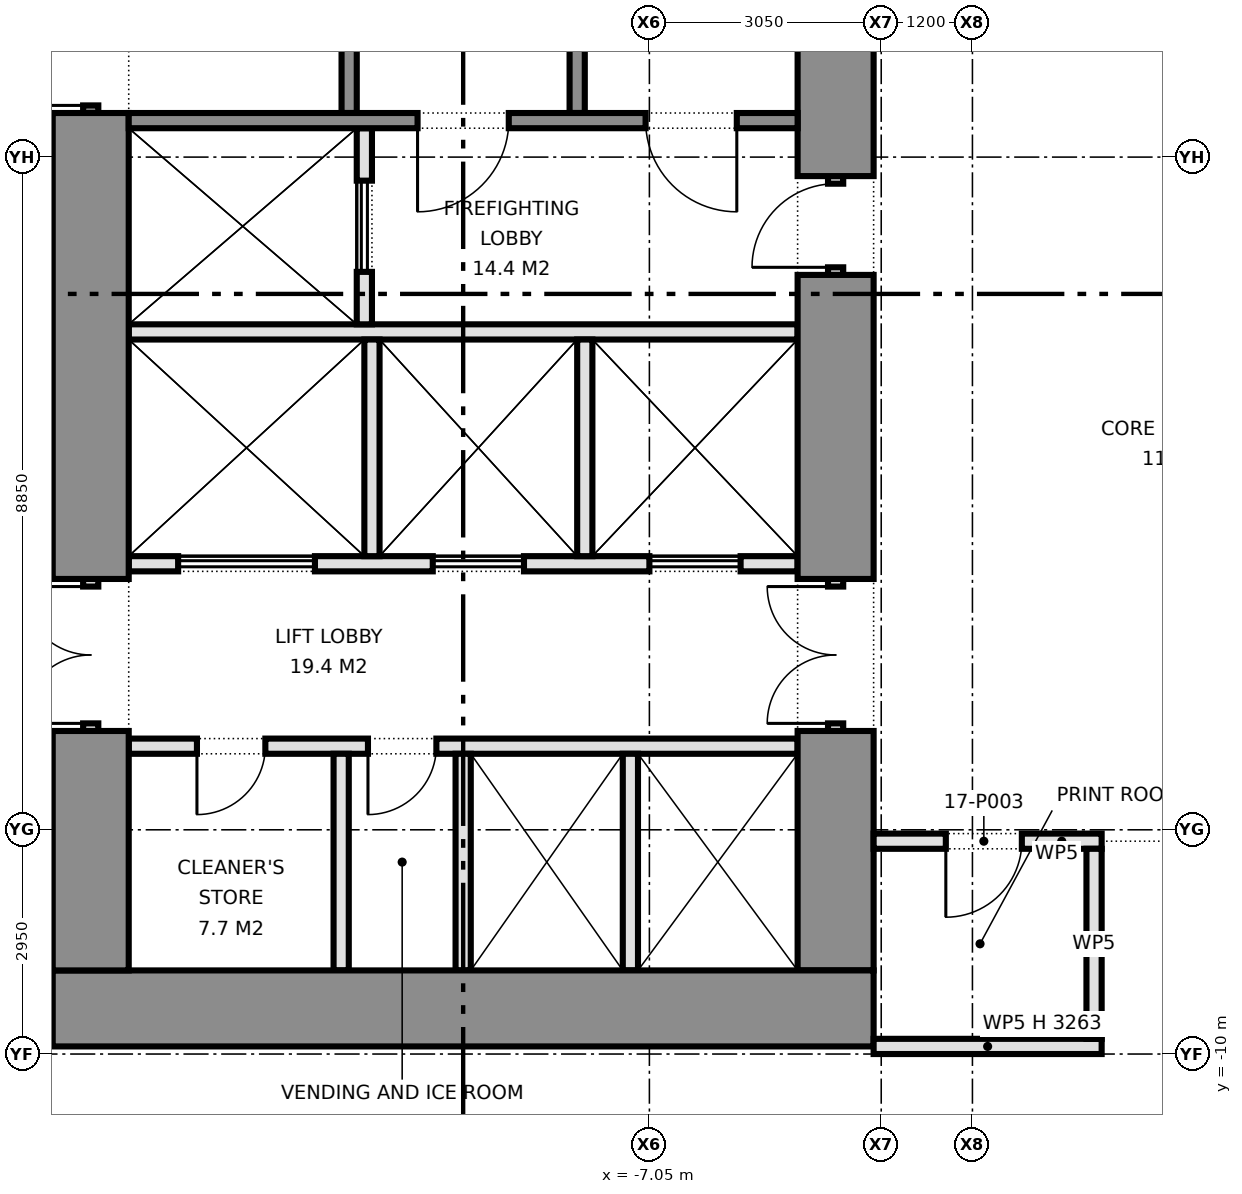
"""IFC4 building model, lengths in metres.
Left out: names, types, materials, properties, quantities, classifications, styles, units other than length and angle.
Written with IfcOpenShell. Run it as: python <this file> out.ifc"""

import sys

from ifc_helpers import new_model, si_unit, direction, frame, frame_2d, origin, place, context, subcontext, project, spatial, rectangle, extrude, element, fill, save


model = new_model("IFC4")
c1 = context("Model", 3, precision=1e-05, world=origin(), true_north=direction((0.0, 1.0)))
c2 = subcontext(c1, "Body", "Model", "MODEL_VIEW")
j1 = project(units=[si_unit("LENGTHUNIT", "METRE"), si_unit("PLANEANGLEUNIT", "RADIAN")], contexts=[c1])
p1 = place(None, origin())
s1 = spatial("IfcSite", under=j1, at=p1, CompositionType="ELEMENT")
p2 = place(p1, origin())
s2 = spatial("IfcBuilding", under=s1, at=p2, CompositionType="ELEMENT")
p3 = place(p2, frame((0.0, 0.0, 77.6)))
s3 = spatial("IfcBuildingStorey", under=s2, at=p3, CompositionType="ELEMENT", Elevation=77.6)
p4 = place(p3, frame((-14.9, -9.4, 0.0), z_axis=(0.0, 0.0, 1.0), x_axis=(1.0, 0.0, 0.0)))
e1 = element("IfcWall", 1, at=p4, inside=s3, PredefinedType="SHEAR", context=c2, shape_type="SweptSolid", body=[
    extrude(rectangle(XDim=10.8, YDim=1.0, at=frame_2d((5.4, 0.0))), origin(), (0.0, 0.0, 1.0), 4.2),
])
p5 = place(p3, frame((-14.4, -8.9, 0.0), z_axis=(0.0, 0.0, 1.0), x_axis=(0.0, 1.0, 0.0)))
e2 = element("IfcWall", 2, at=p5, inside=s3, PredefinedType="SHEAR", context=c2, shape_type="SweptSolid", body=[
    extrude(rectangle(XDim=3.15, YDim=1.0, at=frame_2d((1.575, 0.0))), origin(), (0.0, 0.0, 1.0), 4.2),
])
p6 = place(p3, frame((-14.4, -5.75, 0.0), z_axis=(0.0, 0.0, 1.0), x_axis=(0.0, 1.0, 0.0)))
e3 = element("IfcWall", 3, at=p6, inside=s3, PredefinedType="PARTITIONING", context=c2, shape_type="SweptSolid", body=[
    extrude(rectangle(XDim=2.0, YDim=0.2, at=frame_2d((1.0, 0.0))), origin(), (0.0, 0.0, 1.0), 2.4),
])
p7 = place(p6, frame((0.1, 0.0, 0.0)))
e4 = element("IfcOpeningElement", 4, at=p7, cuts=e3, PredefinedType="OPENING", context=c2, shape_type="SweptSolid", body=[
    extrude(rectangle(XDim=1.8, YDim=2.1, at=frame_2d((0.9, 1.05))), frame((0.0, 0.11, 0.0), z_axis=(0.0, -1.0, 0.0), x_axis=(1.0, 0.0, 0.0)), (0.0, 0.0, 1.0), 0.22),
])
p8 = place(p3, frame((-14.4, -3.75, 0.0), z_axis=(0.0, 0.0, 1.0), x_axis=(0.0, 1.0, 0.0)))
e5 = element("IfcWall", 5, at=p8, inside=s3, PredefinedType="SHEAR", context=c2, shape_type="SweptSolid", body=[
    extrude(rectangle(XDim=6.13, YDim=1.0, at=frame_2d((3.065, 0.0))), origin(), (0.0, 0.0, 1.0), 4.2),
])
p9 = place(p3, frame((-14.4, 2.38, 0.0), z_axis=(0.0, 0.0, 1.0), x_axis=(0.0, 1.0, 0.0)))
e6 = element("IfcWall", 6, at=p9, inside=s3, PredefinedType="SHEAR", context=c2, shape_type="SweptSolid", body=[
    extrude(rectangle(XDim=1.3, YDim=0.2, at=frame_2d((0.65, 0.0))), origin(), (0.0, 0.0, 1.0), 2.4),
])
p10 = place(p9, frame((0.1, 0.0, 0.0)))
e7 = element("IfcOpeningElement", 7, at=p10, cuts=e6, PredefinedType="OPENING", context=c2, shape_type="SweptSolid", body=[
    extrude(rectangle(XDim=1.1, YDim=2.1, at=frame_2d((0.55, 1.05))), frame((0.0, 0.11, 0.0), z_axis=(0.0, -1.0, 0.0), x_axis=(1.0, 0.0, 0.0)), (0.0, 0.0, 1.0), 0.22),
])
p11 = place(p3, frame((-4.6, -8.9, 0.0), z_axis=(0.0, 0.0, 1.0), x_axis=(0.0, 1.0, 0.0)))
e8 = element("IfcWall", 8, at=p11, inside=s3, PredefinedType="SHEAR", context=c2, shape_type="SweptSolid", body=[
    extrude(rectangle(XDim=3.15, YDim=1.0, at=frame_2d((1.575, 0.0))), origin(), (0.0, 0.0, 1.0), 4.2),
])
p12 = place(p3, frame((-4.6, -5.75, 0.0), z_axis=(0.0, 0.0, 1.0), x_axis=(0.0, 1.0, 0.0)))
e9 = element("IfcWall", 9, at=p12, inside=s3, PredefinedType="PARTITIONING", context=c2, shape_type="SweptSolid", body=[
    extrude(rectangle(XDim=2.0, YDim=0.2, at=frame_2d((1.0, 0.0))), origin(), (0.0, 0.0, 1.0), 2.4),
])
p13 = place(p12, frame((0.1, 0.0, 0.0)))
e10 = element("IfcOpeningElement", 10, at=p13, cuts=e9, PredefinedType="OPENING", context=c2, shape_type="SweptSolid", body=[
    extrude(rectangle(XDim=1.8, YDim=2.1, at=frame_2d((0.9, 1.05))), frame((0.0, 0.11, 0.0), z_axis=(0.0, -1.0, 0.0), x_axis=(1.0, 0.0, 0.0)), (0.0, 0.0, 1.0), 0.22),
])
p14 = place(p3, frame((-4.6, -3.75, 0.0), z_axis=(0.0, 0.0, 1.0), x_axis=(0.0, 1.0, 0.0)))
e11 = element("IfcWall", 11, at=p14, inside=s3, PredefinedType="SHEAR", context=c2, shape_type="SweptSolid", body=[
    extrude(rectangle(XDim=4.0, YDim=1.0, at=frame_2d((2.0, 0.0))), origin(), (0.0, 0.0, 1.0), 4.2),
])
p15 = place(p3, frame((-4.6, 0.25, 0.0), z_axis=(0.0, 0.0, 1.0), x_axis=(0.0, 1.0, 0.0)))
e12 = element("IfcWall", 12, at=p15, inside=s3, PredefinedType="PARTITIONING", context=c2, shape_type="SweptSolid", body=[
    extrude(rectangle(XDim=1.3, YDim=0.2, at=frame_2d((0.65, 0.0))), origin(), (0.0, 0.0, 1.0), 2.4),
])
p16 = place(p15, frame((0.1, 0.0, 0.0)))
e13 = element("IfcOpeningElement", 13, at=p16, cuts=e12, PredefinedType="OPENING", context=c2, shape_type="SweptSolid", body=[
    extrude(rectangle(XDim=1.1, YDim=2.1, at=frame_2d((0.55, 1.05))), frame((0.0, 0.11, 0.0), z_axis=(0.0, -1.0, 0.0), x_axis=(1.0, 0.0, 0.0)), (0.0, 0.0, 1.0), 0.22),
])
p17 = place(p3, frame((-4.6, 1.55, 0.0), z_axis=(0.0, 0.0, 1.0), x_axis=(0.0, 1.0, 0.0)))
e14 = element("IfcWall", 14, at=p17, inside=s3, PredefinedType="SHEAR", context=c2, shape_type="SweptSolid", body=[
    extrude(rectangle(XDim=7.35, YDim=1.0, at=frame_2d((3.675, 0.0))), origin(), (0.0, 0.0, 1.0), 4.2),
])
p18 = place(p3, frame((-13.9, -5.95, 0.0), z_axis=(0.0, 0.0, 1.0), x_axis=(1.0, 0.0, 0.0)))
e15 = element("IfcWall", 15, at=p18, inside=s3, PredefinedType="PARTITIONING", context=c2, shape_type="SweptSolid", body=[
    extrude(rectangle(XDim=8.8, YDim=0.2, at=frame_2d((4.4, 0.0))), origin(), (0.0, 0.0, 1.0), 4.2),
])
p19 = place(p18, frame((0.897, 0.0, 0.0)))
e16 = element("IfcOpeningElement", 16, at=p19, cuts=e15, PredefinedType="OPENING", context=c2, shape_type="SweptSolid", body=[
    extrude(rectangle(XDim=0.9, YDim=2.1, at=frame_2d((0.45, 1.05))), frame((0.0, 0.11, 0.0), z_axis=(0.0, -1.0, 0.0), x_axis=(1.0, 0.0, 0.0)), (0.0, 0.0, 1.0), 0.22),
])
p20 = place(p18, frame((3.147, 0.0, 0.0)))
e17 = element("IfcOpeningElement", 17, at=p20, cuts=e15, PredefinedType="OPENING", context=c2, shape_type="SweptSolid", body=[
    extrude(rectangle(XDim=0.9, YDim=2.1, at=frame_2d((0.45, 1.05))), frame((0.0, 0.11, 0.0), z_axis=(0.0, -1.0, 0.0), x_axis=(1.0, 0.0, 0.0)), (0.0, 0.0, 1.0), 0.22),
])
p21 = place(p3, frame((-13.9, -3.55, 0.0), z_axis=(0.0, 0.0, 1.0), x_axis=(1.0, 0.0, 0.0)))
e18 = element("IfcWall", 18, at=p21, inside=s3, PredefinedType="PARTITIONING", context=c2, shape_type="SweptSolid", body=[
    extrude(rectangle(XDim=8.8, YDim=0.2, at=frame_2d((4.4, 0.0))), origin(), (0.0, 0.0, 1.0), 4.2),
])
p22 = place(p21, frame((0.65, 0.0, 0.0)))
e19 = element("IfcOpeningElement", 19, at=p22, cuts=e18, PredefinedType="OPENING", context=c2, shape_type="SweptSolid", body=[
    extrude(rectangle(XDim=1.8, YDim=2.1, at=frame_2d((0.9, 1.05))), frame((0.0, 0.11, 0.0), z_axis=(0.0, -1.0, 0.0), x_axis=(1.0, 0.0, 0.0)), (0.0, 0.0, 1.0), 0.22),
])
p23 = place(p21, frame((4.0, 0.0, 0.0)))
e20 = element("IfcOpeningElement", 20, at=p23, cuts=e18, PredefinedType="OPENING", context=c2, shape_type="SweptSolid", body=[
    extrude(rectangle(XDim=1.2, YDim=2.1, at=frame_2d((0.6, 1.05))), frame((0.0, 0.11, 0.0), z_axis=(0.0, -1.0, 0.0), x_axis=(1.0, 0.0, 0.0)), (0.0, 0.0, 1.0), 0.22),
])
p24 = place(p21, frame((6.85, 0.0, 0.0)))
e21 = element("IfcOpeningElement", 21, at=p24, cuts=e18, PredefinedType="OPENING", context=c2, shape_type="SweptSolid", body=[
    extrude(rectangle(XDim=1.2, YDim=2.1, at=frame_2d((0.6, 1.05))), frame((0.0, 0.11, 0.0), z_axis=(0.0, -1.0, 0.0), x_axis=(1.0, 0.0, 0.0)), (0.0, 0.0, 1.0), 0.22),
])
p25 = place(p3, frame((-13.9, -0.5, 0.0), z_axis=(0.0, 0.0, 1.0), x_axis=(1.0, 0.0, 0.0)))
e22 = element("IfcWall", 22, at=p25, inside=s3, PredefinedType="PARTITIONING", context=c2, shape_type="SweptSolid", body=[
    extrude(rectangle(XDim=8.8, YDim=0.2, at=frame_2d((4.4, 0.0))), origin(), (0.0, 0.0, 1.0), 4.2),
])
p26 = place(p3, frame((-10.8, -0.4, 0.0), z_axis=(0.0, 0.0, 1.0), x_axis=(0.0, 1.0, 0.0)))
e23 = element("IfcWall", 23, at=p26, inside=s3, PredefinedType="PARTITIONING", context=c2, shape_type="SweptSolid", body=[
    extrude(rectangle(XDim=2.58, YDim=0.2, at=frame_2d((1.29, 0.0))), origin(), (0.0, 0.0, 1.0), 4.2),
])
p27 = place(p26, frame((0.69, 0.0, 0.0)))
e24 = element("IfcOpeningElement", 24, at=p27, cuts=e23, PredefinedType="OPENING", context=c2, shape_type="SweptSolid", body=[
    extrude(rectangle(XDim=1.2, YDim=2.1, at=frame_2d((0.6, 1.05))), frame((0.0, 0.11, 0.0), z_axis=(0.0, -1.0, 0.0), x_axis=(1.0, 0.0, 0.0)), (0.0, 0.0, 1.0), 0.22),
])
p28 = place(p3, frame((-13.9, 2.28, 0.0), z_axis=(0.0, 0.0, 1.0), x_axis=(1.0, 0.0, 0.0)))
e25 = element("IfcWall", 25, at=p28, inside=s3, PredefinedType="SHEAR", context=c2, shape_type="SweptSolid", body=[
    extrude(rectangle(XDim=8.8, YDim=0.2, at=frame_2d((4.4, 0.0))), origin(), (0.0, 0.0, 1.0), 4.2),
])
p29 = place(p28, frame((3.8, 0.0, 0.0)))
e26 = element("IfcOpeningElement", 26, at=p29, cuts=e25, PredefinedType="OPENING", context=c2, shape_type="SweptSolid", body=[
    extrude(rectangle(XDim=1.2, YDim=2.1, at=frame_2d((0.6, 1.05))), frame((0.0, 0.11, 0.0), z_axis=(0.0, -1.0, 0.0), x_axis=(1.0, 0.0, 0.0)), (0.0, 0.0, 1.0), 0.22),
])
p30 = place(p28, frame((6.8, 0.0, 0.0)))
e27 = element("IfcOpeningElement", 27, at=p30, cuts=e25, PredefinedType="OPENING", context=c2, shape_type="SweptSolid", body=[
    extrude(rectangle(XDim=1.2, YDim=2.1, at=frame_2d((0.6, 1.05))), frame((0.0, 0.11, 0.0), z_axis=(0.0, -1.0, 0.0), x_axis=(1.0, 0.0, 0.0)), (0.0, 0.0, 1.0), 0.22),
])
for number, where, z_axis, x_axis in (
    (28, (-11.0, 2.38, 0.0), (0.0, 0.0, 1.0), (0.0, 1.0, 0.0)),
    (29, (-8.0, 2.38, 0.0), (0.0, 0.0, 1.0), (0.0, 1.0, 0.0)),
):
    element("IfcWall", number, at=place(p3, frame(where, z_axis=z_axis, x_axis=x_axis)), inside=s3, PredefinedType="SHEAR", context=c2, shape_type="SweptSolid", body=[
        extrude(rectangle(XDim=6.52, YDim=0.2, at=frame_2d((3.26, 0.0))), origin(), (0.0, 0.0, 1.0), 4.2),
    ])
for number, where, z_axis, x_axis in (
    (30, (-9.5, -8.9, 0.0), (0.0, 0.0, 1.0), (0.0, 1.0, 0.0)),
    (31, (-7.3, -8.9, 0.0), (0.0, 0.0, 1.0), (0.0, 1.0, 0.0)),
    (32, (-11.105, -8.9, 0.0), (0.0, 0.0, 1.0), (0.0, 1.0, 0.0)),
    (33, (-10.7, -3.45, 0.0), (0.0, 0.0, 1.0), (0.0, 1.0, 0.0)),
    (34, (-7.9, -3.45, 0.0), (0.0, 0.0, 1.0), (0.0, 1.0, 0.0)),
):
    element("IfcWall", number, at=place(p3, frame(where, z_axis=z_axis, x_axis=x_axis)), inside=s3, PredefinedType="PARTITIONING", context=c2, shape_type="SweptSolid", body=[
        extrude(rectangle(XDim=2.85, YDim=0.2, at=frame_2d((1.425, 0.0))), origin(), (0.0, 0.0, 1.0), 4.2),
    ])
p31 = place(p3, frame((-4.1, -9.9, 0.0), z_axis=(0.0, 0.0, 1.0), x_axis=(1.0, 0.0, 0.0)))
e35 = element("IfcWall", 35, at=p31, inside=s3, PredefinedType="PARTITIONING", context=c2, shape_type="SweptSolid", body=[
    extrude(rectangle(XDim=3.0, YDim=0.2, at=frame_2d((1.5, 0.0))), origin(), (0.0, 0.0, 1.0), 3.263),
])
p32 = place(p3, frame((-4.1, -7.2, 0.0), z_axis=(0.0, 0.0, 1.0), x_axis=(1.0, 0.0, 0.0)))
e36 = element("IfcWall", 36, at=p32, inside=s3, PredefinedType="PARTITIONING", context=c2, shape_type="SweptSolid", body=[
    extrude(rectangle(XDim=3.0, YDim=0.2, at=frame_2d((1.5, 0.0))), origin(), (0.0, 0.0, 1.0), 4.2),
])
p33 = place(p32, frame((0.95, 0.0, 0.0)))
e37 = element("IfcOpeningElement", 37, at=p33, cuts=e36, PredefinedType="OPENING", context=c2, shape_type="SweptSolid", body=[
    extrude(rectangle(XDim=1.0, YDim=2.1, at=frame_2d((0.5, 1.05))), frame((0.0, 0.11, 0.0), z_axis=(0.0, -1.0, 0.0), x_axis=(1.0, 0.0, 0.0)), (0.0, 0.0, 1.0), 0.22),
])
p34 = place(p3, frame((-1.2, -9.8, 0.0), z_axis=(0.0, 0.0, 1.0), x_axis=(0.0, 1.0, 0.0)))
e38 = element("IfcWall", 38, at=p34, inside=s3, PredefinedType="PARTITIONING", context=c2, shape_type="SweptSolid", body=[
    extrude(rectangle(XDim=2.5, YDim=0.2, at=frame_2d((1.25, 0.0))), origin(), (0.0, 0.0, 1.0), 4.2),
])
p35 = place(p7, origin())
e39 = element("IfcDoor", 39, at=p35, inside=s3, OperationType="DOUBLE_DOOR_SINGLE_SWING", PredefinedType="DOOR", context=c2, shape_type="SweptSolid", body=[
    extrude(rectangle(XDim=1.8, YDim=2.1, at=frame_2d((0.9, 1.05))), frame((0.0, 0.025, 0.0), z_axis=(0.0, -1.0, 0.0), x_axis=(1.0, 0.0, 0.0)), (0.0, 0.0, 1.0), 0.05),
])
fill(e4, e39)
p36 = place(p10, origin())
e40 = element("IfcDoor", 40, at=p36, inside=s3, OperationType="SINGLE_SWING_LEFT", PredefinedType="DOOR", context=c2, shape_type="SweptSolid", body=[
    extrude(rectangle(XDim=1.1, YDim=2.1, at=frame_2d((0.55, 1.05))), frame((0.0, 0.025, 0.0), z_axis=(0.0, -1.0, 0.0), x_axis=(1.0, 0.0, 0.0)), (0.0, 0.0, 1.0), 0.05),
])
fill(e7, e40)
p37 = place(p13, origin())
e41 = element("IfcDoor", 41, at=p37, inside=s3, OperationType="DOUBLE_DOOR_SINGLE_SWING", PredefinedType="DOOR", context=c2, shape_type="SweptSolid", body=[
    extrude(rectangle(XDim=1.8, YDim=2.1, at=frame_2d((0.9, 1.05))), frame((0.0, 0.025, 0.0), z_axis=(0.0, -1.0, 0.0), x_axis=(1.0, 0.0, 0.0)), (0.0, 0.0, 1.0), 0.05),
])
fill(e10, e41)
p38 = place(p16, origin())
e42 = element("IfcDoor", 42, at=p38, inside=s3, OperationType="SINGLE_SWING_LEFT", PredefinedType="DOOR", context=c2, shape_type="SweptSolid", body=[
    extrude(rectangle(XDim=1.1, YDim=2.1, at=frame_2d((0.55, 1.05))), frame((0.0, 0.025, 0.0), z_axis=(0.0, -1.0, 0.0), x_axis=(1.0, 0.0, 0.0)), (0.0, 0.0, 1.0), 0.05),
])
fill(e13, e42)
p39 = place(p22, origin())
e43 = element("IfcDoor", 43, at=p39, inside=s3, OperationType="DOUBLE_DOOR_SLIDING", PredefinedType="DOOR", context=c2, shape_type="SweptSolid", body=[
    extrude(rectangle(XDim=1.8, YDim=2.1, at=frame_2d((0.9, 1.05))), frame((0.0, 0.025, 0.0), z_axis=(0.0, -1.0, 0.0), x_axis=(1.0, 0.0, 0.0)), (0.0, 0.0, 1.0), 0.05),
])
fill(e19, e43)
p40 = place(p23, origin())
e44 = element("IfcDoor", 44, at=p40, inside=s3, OperationType="DOUBLE_DOOR_SLIDING", PredefinedType="DOOR", context=c2, shape_type="SweptSolid", body=[
    extrude(rectangle(XDim=1.2, YDim=2.1, at=frame_2d((0.6, 1.05))), frame((0.0, 0.025, 0.0), z_axis=(0.0, -1.0, 0.0), x_axis=(1.0, 0.0, 0.0)), (0.0, 0.0, 1.0), 0.05),
])
fill(e20, e44)
p41 = place(p24, origin())
e45 = element("IfcDoor", 45, at=p41, inside=s3, OperationType="DOUBLE_DOOR_SLIDING", PredefinedType="DOOR", context=c2, shape_type="SweptSolid", body=[
    extrude(rectangle(XDim=1.2, YDim=2.1, at=frame_2d((0.6, 1.05))), frame((0.0, 0.025, 0.0), z_axis=(0.0, -1.0, 0.0), x_axis=(1.0, 0.0, 0.0)), (0.0, 0.0, 1.0), 0.05),
])
fill(e21, e45)
p42 = place(p27, origin())
e46 = element("IfcDoor", 46, at=p42, inside=s3, OperationType="DOUBLE_DOOR_SLIDING", PredefinedType="DOOR", context=c2, shape_type="SweptSolid", body=[
    extrude(rectangle(XDim=1.2, YDim=2.1, at=frame_2d((0.6, 1.05))), frame((0.0, 0.025, 0.0), z_axis=(0.0, -1.0, 0.0), x_axis=(1.0, 0.0, 0.0)), (0.0, 0.0, 1.0), 0.05),
])
fill(e24, e46)
p43 = place(p19, frame((0.9, 0.0, 0.0), z_axis=(0.0, 0.0, 1.0), x_axis=(-1.0, 0.0, 0.0)))
e47 = element("IfcDoor", 47, at=p43, inside=s3, OperationType="SINGLE_SWING_RIGHT", PredefinedType="DOOR", context=c2, shape_type="SweptSolid", body=[
    extrude(rectangle(XDim=0.9, YDim=2.1, at=frame_2d((0.45, 1.05))), frame((0.0, 0.025, 0.0), z_axis=(0.0, -1.0, 0.0), x_axis=(1.0, 0.0, 0.0)), (0.0, 0.0, 1.0), 0.05),
])
fill(e16, e47)
p44 = place(p20, frame((0.9, 0.0, 0.0), z_axis=(0.0, 0.0, 1.0), x_axis=(-1.0, 0.0, 0.0)))
e48 = element("IfcDoor", 48, at=p44, inside=s3, OperationType="SINGLE_SWING_RIGHT", PredefinedType="DOOR", context=c2, shape_type="SweptSolid", body=[
    extrude(rectangle(XDim=0.9, YDim=2.1, at=frame_2d((0.45, 1.05))), frame((0.0, 0.025, 0.0), z_axis=(0.0, -1.0, 0.0), x_axis=(1.0, 0.0, 0.0)), (0.0, 0.0, 1.0), 0.05),
])
fill(e17, e48)
p45 = place(p29, frame((1.2, 0.0, 0.0), z_axis=(0.0, 0.0, 1.0), x_axis=(-1.0, 0.0, 0.0)))
e49 = element("IfcDoor", 49, at=p45, inside=s3, OperationType="SINGLE_SWING_RIGHT", PredefinedType="DOOR", context=c2, shape_type="SweptSolid", body=[
    extrude(rectangle(XDim=1.2, YDim=2.1, at=frame_2d((0.6, 1.05))), frame((0.0, 0.025, 0.0), z_axis=(0.0, -1.0, 0.0), x_axis=(1.0, 0.0, 0.0)), (0.0, 0.0, 1.0), 0.05),
])
fill(e26, e49)
p46 = place(p30, frame((1.2, 0.0, 0.0), z_axis=(0.0, 0.0, 1.0), x_axis=(-1.0, 0.0, 0.0)))
e50 = element("IfcDoor", 50, at=p46, inside=s3, OperationType="SINGLE_SWING_LEFT", PredefinedType="DOOR", context=c2, shape_type="SweptSolid", body=[
    extrude(rectangle(XDim=1.2, YDim=2.1, at=frame_2d((0.6, 1.05))), frame((0.0, 0.025, 0.0), z_axis=(0.0, -1.0, 0.0), x_axis=(1.0, 0.0, 0.0)), (0.0, 0.0, 1.0), 0.05),
])
fill(e27, e50)
p47 = place(p33, frame((1.0, 0.0, 0.0), z_axis=(0.0, 0.0, 1.0), x_axis=(-1.0, 0.0, 0.0)))
e51 = element("IfcDoor", 51, at=p47, inside=s3, OperationType="SINGLE_SWING_RIGHT", PredefinedType="DOOR", context=c2, shape_type="SweptSolid", body=[
    extrude(rectangle(XDim=1.0, YDim=2.1, at=frame_2d((0.5, 1.05))), frame((0.0, 0.025, 0.0), z_axis=(0.0, -1.0, 0.0), x_axis=(1.0, 0.0, 0.0)), (0.0, 0.0, 1.0), 0.05),
])
fill(e37, e51)
save(model, sys.argv[1])
